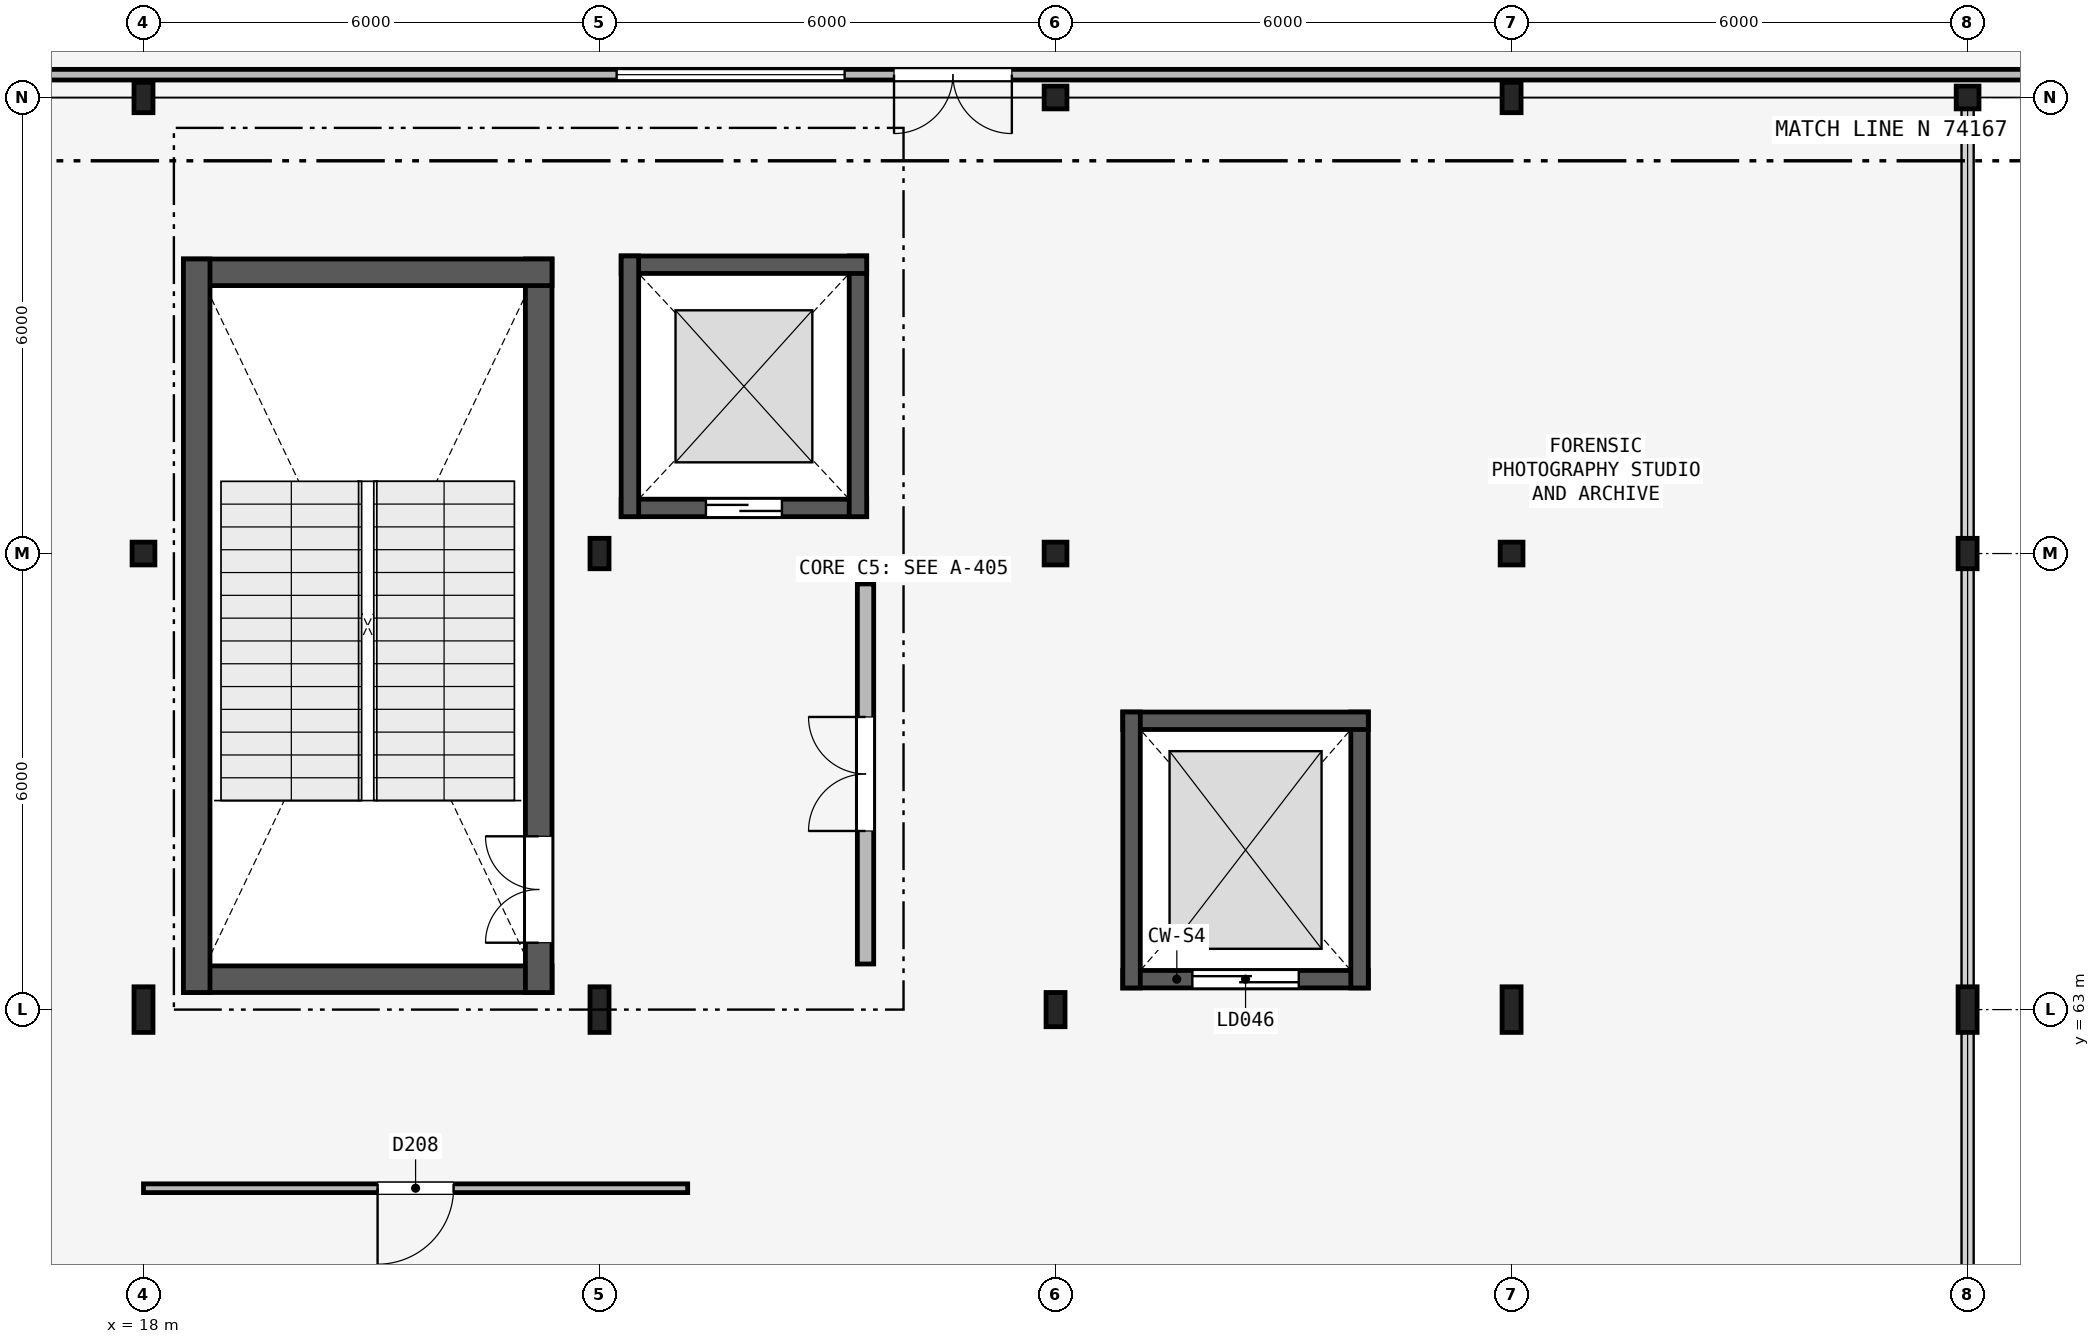
"""IFC4 building model, lengths in metres.
Left out: names, types, materials, properties, quantities, classifications, styles, units other than length and angle.
Written with IfcOpenShell. Run it as: python <this file> out.ifc"""

import sys

from ifc_helpers import new_model, si_unit, direction, frame, frame_2d, origin, origin_2d, place, context, subcontext, project, spatial, rectangle, hollow_rectangle, i_section, extrude, element, fill, save


model = new_model("IFC4")
c1 = context("Model", 3, precision=1e-05, world=origin(), true_north=direction((0.0, 1.0)))
c2 = subcontext(c1, "Body", "Model", "MODEL_VIEW")
j1 = project(units=[si_unit("LENGTHUNIT", "METRE"), si_unit("PLANEANGLEUNIT", "RADIAN")], contexts=[c1])
p1 = place(None, origin())
s1 = spatial("IfcSite", under=j1, at=p1, CompositionType="ELEMENT")
p2 = place(p1, origin())
s2 = spatial("IfcBuilding", under=s1, at=p2, CompositionType="ELEMENT")
p3 = place(p2, frame((0.0, 0.0, 4.8)))
s3 = spatial("IfcBuildingStorey", under=s2, at=p3, CompositionType="ELEMENT", Elevation=4.8)
p4 = place(p3, frame((18.0, 63.0, 0.0), z_axis=(0.0, 0.0, 1.0), x_axis=(1.0, 0.0, 0.0)))
e1 = element("IfcColumn", 1, at=p4, inside=s3, PredefinedType="COLUMN", context=c2, shape_type="SweptSolid", body=[
    extrude(i_section(OverallWidth=0.25, OverallDepth=0.6, WebThickness=0.012, FlangeThickness=0.024, FilletRadius=0.017, at=origin_2d()), origin(), (0.0, 0.0, 1.0), 4.5),
])
p5 = place(p3, frame((18.0, 69.0, 0.0), z_axis=(0.0, 0.0, 1.0), x_axis=(1.0, 0.0, 0.0)))
e2 = element("IfcColumn", 2, at=p5, inside=s3, PredefinedType="COLUMN", context=c2, shape_type="SweptSolid", body=[
    extrude(hollow_rectangle(XDim=0.3, YDim=0.3, WallThickness=0.016, InnerFilletRadius=0.016, OuterFilletRadius=0.032, at=origin_2d()), origin(), (0.0, 0.0, 1.0), 4.5),
])
p6 = place(p3, frame((18.0, 75.0, 0.0), z_axis=(0.0, 0.0, 1.0), x_axis=(1.0, 0.0, 0.0)))
e3 = element("IfcColumn", 3, at=p6, inside=s3, PredefinedType="COLUMN", context=c2, shape_type="SweptSolid", body=[
    extrude(i_section(OverallWidth=0.25, OverallDepth=0.4, WebThickness=0.01, FlangeThickness=0.013, FilletRadius=0.014, at=origin_2d()), origin(), (0.0, 0.0, 1.0), 4.5),
])
p7 = place(p3, frame((24.0, 63.0, 0.0), z_axis=(0.0, 0.0, 1.0), x_axis=(1.0, 0.0, 0.0)))
e4 = element("IfcColumn", 4, at=p7, inside=s3, PredefinedType="COLUMN", context=c2, shape_type="SweptSolid", body=[
    extrude(i_section(OverallWidth=0.25, OverallDepth=0.6, WebThickness=0.012, FlangeThickness=0.024, FilletRadius=0.017, at=origin_2d()), origin(), (0.0, 0.0, 1.0), 4.5),
])
p8 = place(p3, frame((24.0, 69.0, 0.0), z_axis=(0.0, 0.0, 1.0), x_axis=(1.0, 0.0, 0.0)))
e5 = element("IfcColumn", 5, at=p8, inside=s3, PredefinedType="COLUMN", context=c2, shape_type="SweptSolid", body=[
    extrude(i_section(OverallWidth=0.25, OverallDepth=0.4, WebThickness=0.01, FlangeThickness=0.013, FilletRadius=0.014, at=origin_2d()), origin(), (0.0, 0.0, 1.0), 4.5),
])
p9 = place(p3, frame((30.0, 63.0, 0.0), z_axis=(0.0, 0.0, 1.0), x_axis=(1.0, 0.0, 0.0)))
e6 = element("IfcColumn", 6, at=p9, inside=s3, PredefinedType="COLUMN", context=c2, shape_type="SweptSolid", body=[
    extrude(i_section(OverallWidth=0.25, OverallDepth=0.45, WebThickness=0.011, FlangeThickness=0.014, FilletRadius=0.015, at=origin_2d()), origin(), (0.0, 0.0, 1.0), 4.5),
])
for number, where, z_axis, x_axis in (
    (7, (30.0, 69.0, 0.0), (0.0, 0.0, 1.0), (1.0, 0.0, 0.0)),
    (8, (30.0, 75.0, 0.0), (0.0, 0.0, 1.0), (1.0, 0.0, 0.0)),
):
    element("IfcColumn", number, at=place(p3, frame(where, z_axis=z_axis, x_axis=x_axis)), inside=s3, PredefinedType="COLUMN", context=c2, shape_type="SweptSolid", body=[
        extrude(hollow_rectangle(XDim=0.3, YDim=0.3, WallThickness=0.016, InnerFilletRadius=0.016, OuterFilletRadius=0.032, at=origin_2d()), origin(), (0.0, 0.0, 1.0), 4.5),
    ])
p10 = place(p3, frame((36.0, 63.0, 0.0), z_axis=(0.0, 0.0, 1.0), x_axis=(1.0, 0.0, 0.0)))
e9 = element("IfcColumn", 9, at=p10, inside=s3, PredefinedType="COLUMN", context=c2, shape_type="SweptSolid", body=[
    extrude(i_section(OverallWidth=0.25, OverallDepth=0.6, WebThickness=0.012, FlangeThickness=0.024, FilletRadius=0.017, at=origin_2d()), origin(), (0.0, 0.0, 1.0), 4.5),
])
p11 = place(p3, frame((36.0, 69.0, 0.0), z_axis=(0.0, 0.0, 1.0), x_axis=(1.0, 0.0, 0.0)))
e10 = element("IfcColumn", 10, at=p11, inside=s3, PredefinedType="COLUMN", context=c2, shape_type="SweptSolid", body=[
    extrude(hollow_rectangle(XDim=0.3, YDim=0.3, WallThickness=0.016, InnerFilletRadius=0.016, OuterFilletRadius=0.032, at=origin_2d()), origin(), (0.0, 0.0, 1.0), 4.5),
])
p12 = place(p3, frame((36.0, 75.0, 0.0), z_axis=(0.0, 0.0, 1.0), x_axis=(1.0, 0.0, 0.0)))
e11 = element("IfcColumn", 11, at=p12, inside=s3, PredefinedType="COLUMN", context=c2, shape_type="SweptSolid", body=[
    extrude(i_section(OverallWidth=0.25, OverallDepth=0.4, WebThickness=0.01, FlangeThickness=0.013, FilletRadius=0.014, at=origin_2d()), origin(), (0.0, 0.0, 1.0), 4.5),
])
p13 = place(p3, frame((42.0, 63.0, 0.0), z_axis=(0.0, 0.0, 1.0), x_axis=(1.0, 0.0, 0.0)))
e12 = element("IfcColumn", 12, at=p13, inside=s3, PredefinedType="COLUMN", context=c2, shape_type="SweptSolid", body=[
    extrude(i_section(OverallWidth=0.25, OverallDepth=0.6, WebThickness=0.012, FlangeThickness=0.024, FilletRadius=0.017, at=origin_2d()), origin(), (0.0, 0.0, 1.0), 4.5),
])
p14 = place(p3, frame((42.0, 69.0, 0.0), z_axis=(0.0, 0.0, 1.0), x_axis=(1.0, 0.0, 0.0)))
e13 = element("IfcColumn", 13, at=p14, inside=s3, PredefinedType="COLUMN", context=c2, shape_type="SweptSolid", body=[
    extrude(i_section(OverallWidth=0.25, OverallDepth=0.4, WebThickness=0.01, FlangeThickness=0.013, FilletRadius=0.014, at=origin_2d()), origin(), (0.0, 0.0, 1.0), 4.5),
])
p15 = place(p3, frame((42.0, 75.0, 0.0), z_axis=(0.0, 0.0, 1.0), x_axis=(1.0, 0.0, 0.0)))
e14 = element("IfcColumn", 14, at=p15, inside=s3, PredefinedType="COLUMN", context=c2, shape_type="SweptSolid", body=[
    extrude(hollow_rectangle(XDim=0.3, YDim=0.3, WallThickness=0.016, InnerFilletRadius=0.016, OuterFilletRadius=0.032, at=origin_2d()), origin(), (0.0, 0.0, 1.0), 4.5),
])
p16 = place(p3, frame((18.525, 63.4, 0.0), z_axis=(0.0, 0.0, 1.0), x_axis=(1.0, 0.0, 0.0)))
e15 = element("IfcWall", 15, at=p16, inside=s3, PredefinedType="SHEAR", context=c2, shape_type="SweptSolid", body=[
    extrude(rectangle(XDim=4.85, YDim=0.35, at=frame_2d((2.425, 0.0))), origin(), (0.0, 0.0, 1.0), 4.36),
])
p17 = place(p3, frame((23.2, 63.225, 0.0), z_axis=(0.0, 0.0, 1.0), x_axis=(0.0, 1.0, 0.0)))
e16 = element("IfcWall", 16, at=p17, inside=s3, PredefinedType="SHEAR", context=c2, shape_type="SweptSolid", body=[
    extrude(rectangle(XDim=9.65, YDim=0.35, at=frame_2d((4.825, 0.0))), origin(), (0.0, 0.0, 1.0), 4.36),
])
p18 = place(p17, frame((0.655, 0.0, 0.0)))
e17 = element("IfcOpeningElement", 17, at=p18, cuts=e16, PredefinedType="OPENING", context=c2, shape_type="SweptSolid", body=[
    extrude(rectangle(XDim=1.4, YDim=2.2, at=frame_2d((0.7, 1.1))), frame((0.0, 0.185, 0.0), z_axis=(0.0, -1.0, 0.0), x_axis=(1.0, 0.0, 0.0)), (0.0, 0.0, 1.0), 0.37),
])
p19 = place(p3, frame((23.375, 72.7, 0.0), z_axis=(0.0, 0.0, 1.0), x_axis=(-1.0, 0.0, 0.0)))
e18 = element("IfcWall", 18, at=p19, inside=s3, PredefinedType="SHEAR", context=c2, shape_type="SweptSolid", body=[
    extrude(rectangle(XDim=4.85, YDim=0.35, at=frame_2d((2.425, 0.0))), origin(), (0.0, 0.0, 1.0), 4.36),
])
p20 = place(p3, frame((18.7, 72.875, 0.0), z_axis=(0.0, 0.0, 1.0), x_axis=(0.0, -1.0, 0.0)))
e19 = element("IfcWall", 19, at=p20, inside=s3, PredefinedType="SHEAR", context=c2, shape_type="SweptSolid", body=[
    extrude(rectangle(XDim=9.65, YDim=0.35, at=frame_2d((4.825, 0.0))), origin(), (0.0, 0.0, 1.0), 4.36),
])
p21 = place(p3, frame((27.5, 63.6, 0.0), z_axis=(0.0, 0.0, 1.0), x_axis=(0.0, 1.0, 0.0)))
e20 = element("IfcWall", 20, at=p21, inside=s3, PredefinedType="PARTITIONING", context=c2, shape_type="SweptSolid", body=[
    extrude(rectangle(XDim=5.0, YDim=0.215, at=frame_2d((2.5, 0.0))), origin(), (0.0, 0.0, 1.0), 4.19),
])
p22 = place(p21, frame((1.75, 0.0, 0.0)))
e21 = element("IfcOpeningElement", 21, at=p22, cuts=e20, PredefinedType="OPENING", context=c2, shape_type="SweptSolid", body=[
    extrude(rectangle(XDim=1.5, YDim=2.15, at=frame_2d((0.75, 1.075))), frame((0.0, 0.117, 0.0), z_axis=(0.0, -1.0, 0.0), x_axis=(1.0, 0.0, 0.0)), (0.0, 0.0, 1.0), 0.235),
])
p23 = place(p3, frame((24.285, 69.6, 0.0), z_axis=(0.0, 0.0, 1.0), x_axis=(1.0, 0.0, 0.0)))
e22 = element("IfcWall", 22, at=p23, inside=s3, PredefinedType="SHEAR", context=c2, shape_type="SweptSolid", body=[
    extrude(rectangle(XDim=3.23, YDim=0.23, at=frame_2d((1.615, 0.0))), origin(), (0.0, 0.0, 1.0), 4.5),
])
p24 = place(p23, frame((1.115, 0.0, 0.0)))
e23 = element("IfcOpeningElement", 23, at=p24, cuts=e22, PredefinedType="OPENING", context=c2, shape_type="SweptSolid", body=[
    extrude(rectangle(XDim=1.0, YDim=2.15, at=frame_2d((0.5, 1.075))), frame((0.0, 0.125, 0.0), z_axis=(0.0, -1.0, 0.0), x_axis=(1.0, 0.0, 0.0)), (0.0, 0.0, 1.0), 0.25),
])
p25 = place(p3, frame((27.4, 69.485, 0.0), z_axis=(0.0, 0.0, 1.0), x_axis=(0.0, 1.0, 0.0)))
e24 = element("IfcWall", 24, at=p25, inside=s3, PredefinedType="SHEAR", context=c2, shape_type="SweptSolid", body=[
    extrude(rectangle(XDim=3.43, YDim=0.23, at=frame_2d((1.715, 0.0))), origin(), (0.0, 0.0, 1.0), 4.5),
])
p26 = place(p3, frame((27.515, 72.8, 0.0), z_axis=(0.0, 0.0, 1.0), x_axis=(-1.0, 0.0, 0.0)))
e25 = element("IfcWall", 25, at=p26, inside=s3, PredefinedType="SHEAR", context=c2, shape_type="SweptSolid", body=[
    extrude(rectangle(XDim=3.23, YDim=0.23, at=frame_2d((1.615, 0.0))), origin(), (0.0, 0.0, 1.0), 4.5),
])
p27 = place(p3, frame((24.4, 72.915, 0.0), z_axis=(0.0, 0.0, 1.0), x_axis=(0.0, -1.0, 0.0)))
e26 = element("IfcWall", 26, at=p27, inside=s3, PredefinedType="SHEAR", context=c2, shape_type="SweptSolid", body=[
    extrude(rectangle(XDim=3.43, YDim=0.23, at=frame_2d((1.715, 0.0))), origin(), (0.0, 0.0, 1.0), 4.5),
])
p28 = place(p3, frame((30.885, 63.4, 0.0), z_axis=(0.0, 0.0, 1.0), x_axis=(1.0, 0.0, 0.0)))
e27 = element("IfcWall", 27, at=p28, inside=s3, PredefinedType="SHEAR", context=c2, shape_type="SweptSolid", body=[
    extrude(rectangle(XDim=3.23, YDim=0.23, at=frame_2d((1.615, 0.0))), origin(), (0.0, 0.0, 1.0), 4.5),
])
p29 = place(p28, frame((0.915, 0.0, 0.0)))
e28 = element("IfcOpeningElement", 28, at=p29, cuts=e27, PredefinedType="OPENING", context=c2, shape_type="SweptSolid", body=[
    extrude(rectangle(XDim=1.4, YDim=2.3, at=frame_2d((0.7, 1.15))), frame((0.0, 0.125, 0.0), z_axis=(0.0, -1.0, 0.0), x_axis=(1.0, 0.0, 0.0)), (0.0, 0.0, 1.0), 0.25),
])
p30 = place(p3, frame((34.0, 63.285, 0.0), z_axis=(0.0, 0.0, 1.0), x_axis=(0.0, 1.0, 0.0)))
e29 = element("IfcWall", 29, at=p30, inside=s3, PredefinedType="SHEAR", context=c2, shape_type="SweptSolid", body=[
    extrude(rectangle(XDim=3.63, YDim=0.23, at=frame_2d((1.815, 0.0))), origin(), (0.0, 0.0, 1.0), 4.5),
])
p31 = place(p3, frame((34.115, 66.8, 0.0), z_axis=(0.0, 0.0, 1.0), x_axis=(-1.0, 0.0, 0.0)))
e30 = element("IfcWall", 30, at=p31, inside=s3, PredefinedType="SHEAR", context=c2, shape_type="SweptSolid", body=[
    extrude(rectangle(XDim=3.23, YDim=0.23, at=frame_2d((1.615, 0.0))), origin(), (0.0, 0.0, 1.0), 4.5),
])
p32 = place(p3, frame((31.0, 66.915, 0.0), z_axis=(0.0, 0.0, 1.0), x_axis=(0.0, -1.0, 0.0)))
e31 = element("IfcWall", 31, at=p32, inside=s3, PredefinedType="SHEAR", context=c2, shape_type="SweptSolid", body=[
    extrude(rectangle(XDim=3.63, YDim=0.23, at=frame_2d((1.815, 0.0))), origin(), (0.0, 0.0, 1.0), 4.5),
])
p33 = place(p3, frame((25.16, 60.65, 0.0), z_axis=(0.0, 0.0, 1.0), x_axis=(-1.0, 0.0, 0.0)))
e32 = element("IfcWall", 32, at=p33, inside=s3, PredefinedType="PARTITIONING", context=c2, shape_type="SweptSolid", body=[
    extrude(rectangle(XDim=7.16, YDim=0.115, at=frame_2d((3.58, 0.0))), origin(), (0.0, 0.0, 1.0), 3.74),
])
p34 = place(p33, frame((3.08, 0.0, 0.0)))
e33 = element("IfcOpeningElement", 33, at=p34, cuts=e32, PredefinedType="OPENING", context=c2, shape_type="SweptSolid", body=[
    extrude(rectangle(XDim=1.0, YDim=2.15, at=frame_2d((0.5, 1.075))), frame((0.0, 0.067, 0.0), z_axis=(0.0, -1.0, 0.0), x_axis=(1.0, 0.0, 0.0)), (0.0, 0.0, 1.0), 0.135),
])
p35 = place(p3, frame((53.5, 75.3, 0.0), z_axis=(0.0, 0.0, 1.0), x_axis=(-1.0, 0.0, 0.0)))
e34 = element("IfcWall", 34, at=p35, inside=s3, PredefinedType="PARTITIONING", context=c2, shape_type="SweptSolid", body=[
    extrude(rectangle(XDim=47.0, YDim=0.14, at=frame_2d((23.5, 0.0))), origin(), (0.0, 0.0, 1.0), 2.99),
])
p36 = place(p35, frame((24.075, 0.0, 0.0)))
e35 = element("IfcOpeningElement", 35, at=p36, cuts=e34, PredefinedType="OPENING", context=c2, shape_type="SweptSolid", body=[
    extrude(rectangle(XDim=1.55, YDim=2.2, at=frame_2d((0.775, 1.1))), frame((0.0, 0.08, 0.0), z_axis=(0.0, -1.0, 0.0), x_axis=(1.0, 0.0, 0.0)), (0.0, 0.0, 1.0), 0.16),
])
p37 = place(p35, frame((26.275, 0.0, 0.95)))
e36 = element("IfcOpeningElement", 36, at=p37, cuts=e34, PredefinedType="OPENING", context=c2, shape_type="SweptSolid", body=[
    extrude(rectangle(XDim=3.0, YDim=1.3, at=frame_2d((1.5, 0.65))), frame((0.0, 0.08, 0.0), z_axis=(0.0, -1.0, 0.0), x_axis=(1.0, 0.0, 0.0)), (0.0, 0.0, 1.0), 0.16),
])
p38 = place(p18, origin())
e37 = element("IfcDoor", 37, at=p38, inside=s3, OperationType="DOUBLE_DOOR_SINGLE_SWING", PredefinedType="DOOR", context=c2, shape_type="SweptSolid", body=[
    extrude(rectangle(XDim=1.4, YDim=2.2, at=frame_2d((0.7, 1.1))), frame((0.0, 0.025, 0.0), z_axis=(0.0, -1.0, 0.0), x_axis=(1.0, 0.0, 0.0)), (0.0, 0.0, 1.0), 0.05),
])
fill(e17, e37)
p39 = place(p22, origin())
e38 = element("IfcDoor", 38, at=p39, inside=s3, OperationType="DOUBLE_DOOR_SINGLE_SWING", PredefinedType="DOOR", context=c2, shape_type="SweptSolid", body=[
    extrude(rectangle(XDim=1.5, YDim=2.15, at=frame_2d((0.75, 1.075))), frame((0.0, 0.025, 0.0), z_axis=(0.0, -1.0, 0.0), x_axis=(1.0, 0.0, 0.0)), (0.0, 0.0, 1.0), 0.05),
])
fill(e21, e38)
p40 = place(p24, origin())
e39 = element("IfcDoor", 39, at=p40, inside=s3, OperationType="SLIDING_TO_LEFT", PredefinedType="DOOR", context=c2, shape_type="SweptSolid", body=[
    extrude(rectangle(XDim=1.0, YDim=2.15, at=frame_2d((0.5, 1.075))), frame((0.0, 0.025, 0.0), z_axis=(0.0, -1.0, 0.0), x_axis=(1.0, 0.0, 0.0)), (0.0, 0.0, 1.0), 0.05),
])
fill(e23, e39)
p41 = place(p29, origin())
e40 = element("IfcDoor", 40, at=p41, inside=s3, OperationType="SLIDING_TO_LEFT", PredefinedType="DOOR", context=c2, shape_type="SweptSolid", body=[
    extrude(rectangle(XDim=1.4, YDim=2.3, at=frame_2d((0.7, 1.15))), frame((0.0, 0.025, 0.0), z_axis=(0.0, -1.0, 0.0), x_axis=(1.0, 0.0, 0.0)), (0.0, 0.0, 1.0), 0.05),
])
fill(e28, e40)
p42 = place(p34, origin())
e41 = element("IfcDoor", 41, at=p42, inside=s3, OperationType="SINGLE_SWING_RIGHT", PredefinedType="DOOR", context=c2, shape_type="SweptSolid", body=[
    extrude(rectangle(XDim=1.0, YDim=2.15, at=frame_2d((0.5, 1.075))), frame((0.0, 0.025, 0.0), z_axis=(0.0, -1.0, 0.0), x_axis=(1.0, 0.0, 0.0)), (0.0, 0.0, 1.0), 0.05),
])
fill(e33, e41)
p43 = place(p36, origin())
e42 = element("IfcDoor", 42, at=p43, inside=s3, OperationType="DOUBLE_DOOR_SINGLE_SWING", PredefinedType="DOOR", context=c2, shape_type="SweptSolid", body=[
    extrude(rectangle(XDim=1.55, YDim=2.2, at=frame_2d((0.775, 1.1))), frame((0.0, 0.025, 0.0), z_axis=(0.0, -1.0, 0.0), x_axis=(1.0, 0.0, 0.0)), (0.0, 0.0, 1.0), 0.05),
])
fill(e35, e42)
p44 = place(p37, origin())
e43 = element("IfcWindow", 43, at=p44, inside=s3, PartitioningType="SINGLE_PANEL", PredefinedType="WINDOW", context=c2, shape_type="SweptSolid", body=[
    extrude(rectangle(XDim=3.0, YDim=1.3, at=frame_2d((1.5, 0.65))), frame((0.0, 0.03, 0.0), z_axis=(0.0, -1.0, 0.0), x_axis=(1.0, 0.0, 0.0)), (0.0, 0.0, 1.0), 0.06),
])
fill(e36, e43)
save(model, sys.argv[1])
